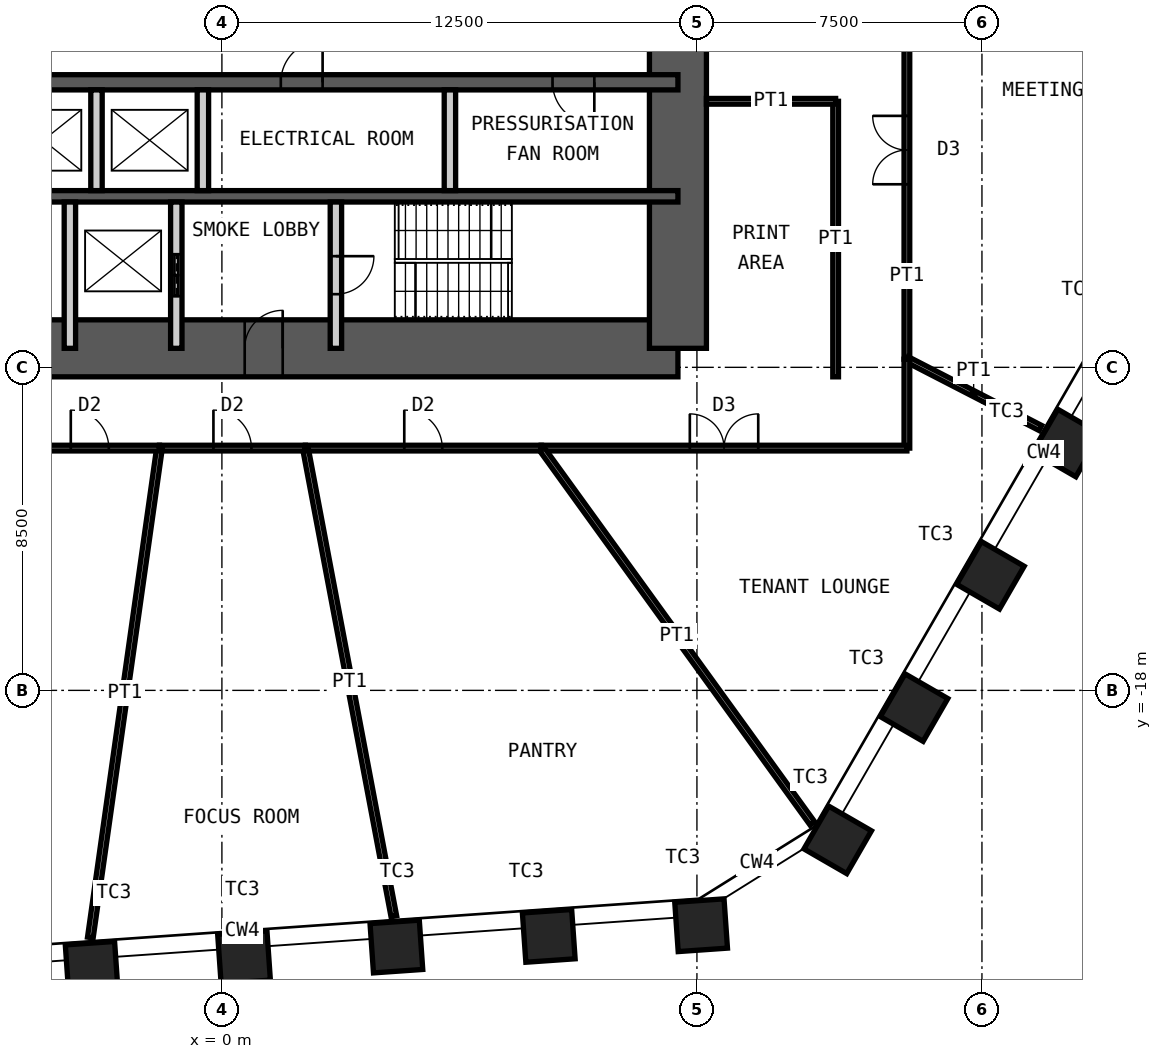
"""IFC4 building model, lengths in metres.
Left out: names, types, materials, properties, quantities, classifications, styles, units other than length and angle.
Written with IfcOpenShell. Run it as: python <this file> out.ifc"""

import sys

from ifc_helpers import new_model, si_unit, direction, frame, frame_2d, origin, origin_2d, place, context, subcontext, project, spatial, rectangle, hollow_rectangle, extrude, element, fill, save


model = new_model("IFC4")
c1 = context("Model", 3, precision=1e-05, world=origin(), true_north=direction((0.0, 1.0)))
c2 = subcontext(c1, "Body", "Model", "MODEL_VIEW")
j1 = project(units=[si_unit("LENGTHUNIT", "METRE"), si_unit("PLANEANGLEUNIT", "RADIAN")], contexts=[c1])
p1 = place(None, origin())
s1 = spatial("IfcSite", under=j1, at=p1, CompositionType="ELEMENT")
p2 = place(p1, origin())
s2 = spatial("IfcBuilding", under=s1, at=p2, CompositionType="ELEMENT")
p3 = place(p2, frame((0.0, 0.0, 115.6)))
s3 = spatial("IfcBuildingStorey", under=s2, at=p3, CompositionType="ELEMENT", Elevation=115.6)
for number, where, z_axis, x_axis in (
    (1, (22.233, -11.491, 0.0), (0.0, 0.0, 1.0), (0.5, 0.866, 0.0)),
    (2, (20.223, -14.972, 0.0), (0.0, 0.0, 1.0), (0.5, 0.866, 0.0)),
    (3, (18.214, -18.453, 0.0), (0.0, 0.0, 1.0), (0.5, 0.866, 0.0)),
    (4, (16.204, -21.933, 0.0), (0.0, 0.0, 1.0), (0.5, 0.866, 0.0)),
    (5, (12.61, -24.179, 0.0), (0.0, 0.0, 1.0), (0.998, 0.07, 0.0)),
    (6, (8.601, -24.46, 0.0), (0.0, 0.0, 1.0), (0.998, 0.07, 0.0)),
    (7, (4.592, -24.74, 0.0), (0.0, 0.0, 1.0), (0.998, 0.07, 0.0)),
    (8, (0.582, -25.02, 0.0), (0.0, 0.0, 1.0), (0.998, 0.07, 0.0)),
    (9, (-3.427, -25.301, 0.0), (0.0, 0.0, 1.0), (0.998, 0.07, 0.0)),
):
    element("IfcColumn", number, at=place(p3, frame(where, z_axis=z_axis, x_axis=x_axis)), inside=s3, PredefinedType="COLUMN", context=c2, shape_type="SweptSolid", body=[
        extrude(hollow_rectangle(XDim=1.3, YDim=1.3, WallThickness=0.1, at=origin_2d()), origin(), (0.0, 0.0, 1.0), 4.2),
    ])
p4 = place(p3, frame((-12.0, -9.0, 0.0), z_axis=(0.0, 0.0, 1.0), x_axis=(1.0, 0.0, 0.0)))
e10 = element("IfcWall", 10, at=p4, inside=s3, PredefinedType="SHEAR", context=c2, shape_type="SweptSolid", body=[
    extrude(rectangle(XDim=24.0, YDim=1.5, at=frame_2d((12.0, 0.0))), origin(), (0.0, 0.0, 1.0), 4.2),
])
p5 = place(p4, frame((1.35, 0.0, 0.0)))
e11 = element("IfcOpeningElement", 11, at=p5, cuts=e10, PredefinedType="OPENING", context=c2, shape_type="SweptSolid", body=[
    extrude(rectangle(XDim=1.0, YDim=2.1, at=frame_2d((0.5, 1.05))), frame((0.0, 0.76, 0.0), z_axis=(0.0, -1.0, 0.0), x_axis=(1.0, 0.0, 0.0)), (0.0, 0.0, 1.0), 1.52),
])
p6 = place(p4, frame((5.325, 0.0, 0.0)))
e12 = element("IfcOpeningElement", 12, at=p6, cuts=e10, PredefinedType="OPENING", context=c2, shape_type="SweptSolid", body=[
    extrude(rectangle(XDim=1.15, YDim=2.1, at=frame_2d((0.575, 1.05))), frame((0.0, 0.76, 0.0), z_axis=(0.0, -1.0, 0.0), x_axis=(1.0, 0.0, 0.0)), (0.0, 0.0, 1.0), 1.52),
])
p7 = place(p4, frame((12.6, 0.0, 0.0)))
e13 = element("IfcOpeningElement", 13, at=p7, cuts=e10, PredefinedType="OPENING", context=c2, shape_type="SweptSolid", body=[
    extrude(rectangle(XDim=1.0, YDim=2.1, at=frame_2d((0.5, 1.05))), frame((0.0, 0.76, 0.0), z_axis=(0.0, -1.0, 0.0), x_axis=(1.0, 0.0, 0.0)), (0.0, 0.0, 1.0), 1.52),
])
p8 = place(p3, frame((12.0, -9.0, 0.0), z_axis=(0.0, 0.0, 1.0), x_axis=(0.0, 1.0, 0.0)))
e14 = element("IfcWall", 14, at=p8, inside=s3, PredefinedType="SHEAR", context=c2, shape_type="SweptSolid", body=[
    extrude(rectangle(XDim=18.0, YDim=1.5, at=frame_2d((9.0, 0.0))), origin(), (0.0, 0.0, 1.0), 4.2),
])
p9 = place(p8, frame((8.1, 0.0, 0.0)))
e15 = element("IfcOpeningElement", 15, at=p9, cuts=e14, PredefinedType="OPENING", context=c2, shape_type="SweptSolid", body=[
    extrude(rectangle(XDim=1.8, YDim=2.1, at=frame_2d((0.9, 1.05))), frame((0.0, 0.76, 0.0), z_axis=(0.0, -1.0, 0.0), x_axis=(1.0, 0.0, 0.0)), (0.0, 0.0, 1.0), 1.52),
])
p10 = place(p3, frame((-12.0, -2.0, 0.0), z_axis=(0.0, 0.0, 1.0), x_axis=(1.0, 0.0, 0.0)))
e16 = element("IfcWall", 16, at=p10, inside=s3, PredefinedType="SHEAR", context=c2, shape_type="SweptSolid", body=[
    extrude(rectangle(XDim=24.0, YDim=0.4, at=frame_2d((12.0, 0.0))), origin(), (0.0, 0.0, 1.0), 4.2),
])
p11 = place(p10, frame((1.1, 0.0, 0.0)))
e17 = element("IfcOpeningElement", 17, at=p11, cuts=e16, PredefinedType="OPENING", context=c2, shape_type="SweptSolid", body=[
    extrude(rectangle(XDim=1.1, YDim=2.1, at=frame_2d((0.55, 1.05))), frame((0.0, 0.21, 0.0), z_axis=(0.0, -1.0, 0.0), x_axis=(1.0, 0.0, 0.0)), (0.0, 0.0, 1.0), 0.42),
])
p12 = place(p10, frame((13.55, 0.0, 0.0)))
e18 = element("IfcOpeningElement", 18, at=p12, cuts=e16, PredefinedType="OPENING", context=c2, shape_type="SweptSolid", body=[
    extrude(rectangle(XDim=1.1, YDim=2.1, at=frame_2d((0.55, 1.05))), frame((0.0, 0.21, 0.0), z_axis=(0.0, -1.0, 0.0), x_axis=(1.0, 0.0, 0.0)), (0.0, 0.0, 1.0), 0.42),
])
p13 = place(p10, frame((20.7, 0.0, 0.0)))
e19 = element("IfcOpeningElement", 19, at=p13, cuts=e16, PredefinedType="OPENING", context=c2, shape_type="SweptSolid", body=[
    extrude(rectangle(XDim=1.1, YDim=2.1, at=frame_2d((0.55, 1.05))), frame((0.0, 0.21, 0.0), z_axis=(0.0, -1.0, 0.0), x_axis=(1.0, 0.0, 0.0)), (0.0, 0.0, 1.0), 0.42),
])
p14 = place(p10, frame((4.0, 0.0, 0.0)))
e20 = element("IfcOpeningElement", 20, at=p14, cuts=e16, PredefinedType="OPENING", context=c2, shape_type="SweptSolid", body=[
    extrude(rectangle(XDim=1.0, YDim=2.1, at=frame_2d((0.5, 1.05))), frame((0.0, 0.21, 0.0), z_axis=(0.0, -1.0, 0.0), x_axis=(1.0, 0.0, 0.0)), (0.0, 0.0, 1.0), 0.42),
])
p15 = place(p3, frame((-12.0, -5.0, 0.0), z_axis=(0.0, 0.0, 1.0), x_axis=(1.0, 0.0, 0.0)))
e21 = element("IfcWall", 21, at=p15, inside=s3, PredefinedType="SHEAR", context=c2, shape_type="SweptSolid", body=[
    extrude(rectangle(XDim=24.0, YDim=0.3, at=frame_2d((12.0, 0.0))), origin(), (0.0, 0.0, 1.0), 4.2),
])
for number, where, z_axis, x_axis in (
    (22, (-3.3, -4.85, 0.0), (0.0, 0.0, 1.0), (0.0, 1.0, 0.0)),
    (23, (-0.5, -4.85, 0.0), (0.0, 0.0, 1.0), (0.0, 1.0, 0.0)),
    (24, (6.0, -4.85, 0.0), (0.0, 0.0, 1.0), (0.0, 1.0, 0.0)),
):
    element("IfcWall", number, at=place(p3, frame(where, z_axis=z_axis, x_axis=x_axis)), inside=s3, PredefinedType="PARTITIONING", context=c2, shape_type="SweptSolid", body=[
        extrude(rectangle(XDim=2.65, YDim=0.3, at=frame_2d((1.325, 0.0))), origin(), (0.0, 0.0, 1.0), 3.98),
    ])
p16 = place(p3, frame((-4.0, -9.0, 0.0), z_axis=(0.0, 0.0, 1.0), x_axis=(0.0, 1.0, 0.0)))
e25 = element("IfcWall", 25, at=p16, inside=s3, PredefinedType="PARTITIONING", context=c2, shape_type="SweptSolid", body=[
    extrude(rectangle(XDim=3.85, YDim=0.3, at=frame_2d((1.925, 0.0))), origin(), (0.0, 0.0, 1.0), 3.98),
])
p17 = place(p3, frame((-1.2, -9.0, 0.0), z_axis=(0.0, 0.0, 1.0), x_axis=(0.0, 1.0, 0.0)))
e26 = element("IfcWall", 26, at=p17, inside=s3, PredefinedType="PARTITIONING", context=c2, shape_type="SweptSolid", body=[
    extrude(rectangle(XDim=3.85, YDim=0.3, at=frame_2d((1.925, 0.0))), origin(), (0.0, 0.0, 1.0), 3.98),
])
p18 = place(p17, frame((1.375, 0.0, 0.0)))
e27 = element("IfcOpeningElement", 27, at=p18, cuts=e26, PredefinedType="OPENING", context=c2, shape_type="SweptSolid", body=[
    extrude(rectangle(XDim=1.1, YDim=2.4, at=frame_2d((0.55, 1.2))), frame((0.0, 0.16, 0.0), z_axis=(0.0, -1.0, 0.0), x_axis=(1.0, 0.0, 0.0)), (0.0, 0.0, 1.0), 0.32),
])
p19 = place(p3, frame((3.0, -9.0, 0.0), z_axis=(0.0, 0.0, 1.0), x_axis=(0.0, 1.0, 0.0)))
e28 = element("IfcWall", 28, at=p19, inside=s3, PredefinedType="PARTITIONING", context=c2, shape_type="SweptSolid", body=[
    extrude(rectangle(XDim=3.85, YDim=0.3, at=frame_2d((1.925, 0.0))), origin(), (0.0, 0.0, 1.0), 3.98),
])
p20 = place(p19, frame((1.425, 0.0, 0.0)))
e29 = element("IfcOpeningElement", 29, at=p20, cuts=e28, PredefinedType="OPENING", context=c2, shape_type="SweptSolid", body=[
    extrude(rectangle(XDim=1.0, YDim=2.1, at=frame_2d((0.5, 1.05))), frame((0.0, 0.16, 0.0), z_axis=(0.0, -1.0, 0.0), x_axis=(1.0, 0.0, 0.0)), (0.0, 0.0, 1.0), 0.32),
])
p21 = place(p3, frame((18.025, 1.719, 0.0), z_axis=(0.0, 0.0, 1.0), x_axis=(0.0, -1.0, 0.0)))
e30 = element("IfcWall", 30, at=p21, inside=s3, PredefinedType="PARTITIONING", context=c2, shape_type="SweptSolid", body=[
    extrude(rectangle(XDim=11.006, YDim=0.15, at=frame_2d((5.503, 0.0))), origin(), (0.0, 0.0, 1.0), 4.03),
])
p22 = place(p21, frame((4.603, 0.0, 0.0)))
e31 = element("IfcOpeningElement", 31, at=p22, cuts=e30, PredefinedType="OPENING", context=c2, shape_type="SweptSolid", body=[
    extrude(rectangle(XDim=1.8, YDim=2.4, at=frame_2d((0.9, 1.2))), frame((0.0, 0.085, 0.0), z_axis=(0.0, -1.0, 0.0), x_axis=(1.0, 0.0, 0.0)), (0.0, 0.0, 1.0), 0.17),
])
p23 = place(p3, frame((21.538, -11.096, 0.0), z_axis=(0.0, 0.0, 1.0), x_axis=(-0.888987513346, 0.457931437134, 0.0)))
e32 = element("IfcWall", 32, at=p23, inside=s3, PredefinedType="PARTITIONING", context=c2, shape_type="SweptSolid", body=[
    extrude(rectangle(XDim=3.952, YDim=0.15, at=frame_2d((1.976, 0.0))), origin(), (0.0, 0.0, 1.0), 3.33),
])
p24 = place(p3, frame((18.025, -9.286, 0.0), z_axis=(0.0, 0.0, 1.0), x_axis=(0.0, -1.0, 0.0)))
e33 = element("IfcWall", 33, at=p24, inside=s3, PredefinedType="PARTITIONING", context=c2, shape_type="SweptSolid", body=[
    extrude(rectangle(XDim=2.339, YDim=0.15, at=frame_2d((1.169, 0.0))), origin(), (0.0, 0.0, 1.0), 4.03),
])
p25 = place(p3, frame((18.025, -11.625, 0.0), z_axis=(0.0, 0.0, 1.0), x_axis=(-1.0, 0.0, 0.0)))
e34 = element("IfcWall", 34, at=p25, inside=s3, PredefinedType="PARTITIONING", context=c2, shape_type="SweptSolid", body=[
    extrude(rectangle(XDim=9.624, YDim=0.15, at=frame_2d((4.812, 0.0))), origin(), (0.0, 0.0, 1.0), 4.03),
])
p26 = place(p25, frame((3.912, 0.0, 0.0)))
e35 = element("IfcOpeningElement", 35, at=p26, cuts=e34, PredefinedType="OPENING", context=c2, shape_type="SweptSolid", body=[
    extrude(rectangle(XDim=1.8, YDim=2.4, at=frame_2d((0.9, 1.2))), frame((0.0, 0.085, 0.0), z_axis=(0.0, -1.0, 0.0), x_axis=(1.0, 0.0, 0.0)), (0.0, 0.0, 1.0), 0.17),
])
p27 = place(p3, frame((15.54, -21.502, 0.0), z_axis=(0.0, 0.0, 1.0), x_axis=(-0.585731902034, 0.810504866697, 0.0)))
e36 = element("IfcWall", 36, at=p27, inside=s3, PredefinedType="PARTITIONING", context=c2, shape_type="SweptSolid", body=[
    extrude(rectangle(XDim=12.187, YDim=0.15, at=frame_2d((6.093, 0.0))), origin(), (0.0, 0.0, 1.0), 2.93),
])
p28 = place(p3, frame((8.401, -11.625, 0.0), z_axis=(0.0, 0.0, 1.0), x_axis=(-1.0, 0.0, 0.0)))
e37 = element("IfcWall", 37, at=p28, inside=s3, PredefinedType="PARTITIONING", context=c2, shape_type="SweptSolid", body=[
    extrude(rectangle(XDim=6.205, YDim=0.15, at=frame_2d((3.103, 0.0))), origin(), (0.0, 0.0, 1.0), 4.03),
])
p29 = place(p28, frame((2.602, 0.0, 0.0)))
e38 = element("IfcOpeningElement", 38, at=p29, cuts=e37, PredefinedType="OPENING", context=c2, shape_type="SweptSolid", body=[
    extrude(rectangle(XDim=1.0, YDim=2.4, at=frame_2d((0.5, 1.2))), frame((0.0, 0.085, 0.0), z_axis=(0.0, -1.0, 0.0), x_axis=(1.0, 0.0, 0.0)), (0.0, 0.0, 1.0), 0.17),
])
p30 = place(p3, frame((4.524, -23.943, 0.0), z_axis=(0.0, 0.0, 1.0), x_axis=(-0.185671124909, 0.98261194445, 0.0)))
e39 = element("IfcWall", 39, at=p30, inside=s3, PredefinedType="PARTITIONING", context=c2, shape_type="SweptSolid", body=[
    extrude(rectangle(XDim=12.536, YDim=0.15, at=frame_2d((6.268, 0.0))), origin(), (0.0, 0.0, 1.0), 3.33),
])
p31 = place(p3, frame((2.197, -11.625, 0.0), z_axis=(0.0, 0.0, 1.0), x_axis=(-1.0, 0.0, 0.0)))
e40 = element("IfcWall", 40, at=p31, inside=s3, PredefinedType="PARTITIONING", context=c2, shape_type="SweptSolid", body=[
    extrude(rectangle(XDim=3.839, YDim=0.15, at=frame_2d((1.919, 0.0))), origin(), (0.0, 0.0, 1.0), 4.03),
])
p32 = place(p31, frame((1.419, 0.0, 0.0)))
e41 = element("IfcOpeningElement", 41, at=p32, cuts=e40, PredefinedType="OPENING", context=c2, shape_type="SweptSolid", body=[
    extrude(rectangle(XDim=1.0, YDim=2.4, at=frame_2d((0.5, 1.2))), frame((0.0, 0.085, 0.0), z_axis=(0.0, -1.0, 0.0), x_axis=(1.0, 0.0, 0.0)), (0.0, 0.0, 1.0), 0.17),
])
p33 = place(p3, frame((-3.462, -24.503, 0.0), z_axis=(0.0, 0.0, 1.0), x_axis=(0.139899618934, 0.990165691499, 0.0)))
e42 = element("IfcWall", 42, at=p33, inside=s3, PredefinedType="PARTITIONING", context=c2, shape_type="SweptSolid", body=[
    extrude(rectangle(XDim=13.006, YDim=0.15, at=frame_2d((6.503, 0.0))), origin(), (0.0, 0.0, 1.0), 3.33),
])
p34 = place(p3, frame((-1.642, -11.625, 0.0), z_axis=(0.0, 0.0, 1.0), x_axis=(-1.0, 0.0, 0.0)))
e43 = element("IfcWall", 43, at=p34, inside=s3, PredefinedType="PARTITIONING", context=c2, shape_type="SweptSolid", body=[
    extrude(rectangle(XDim=3.668, YDim=0.15, at=frame_2d((1.834, 0.0))), origin(), (0.0, 0.0, 1.0), 4.03),
])
p35 = place(p34, frame((1.334, 0.0, 0.0)))
e44 = element("IfcOpeningElement", 44, at=p35, cuts=e43, PredefinedType="OPENING", context=c2, shape_type="SweptSolid", body=[
    extrude(rectangle(XDim=1.0, YDim=2.4, at=frame_2d((0.5, 1.2))), frame((0.0, 0.085, 0.0), z_axis=(0.0, -1.0, 0.0), x_axis=(1.0, 0.0, 0.0)), (0.0, 0.0, 1.0), 0.17),
])
p36 = place(p3, frame((16.15, -9.75, 0.0), z_axis=(0.0, 0.0, 1.0), x_axis=(0.0, 1.0, 0.0)))
e45 = element("IfcWall", 45, at=p36, inside=s3, PredefinedType="PARTITIONING", context=c2, shape_type="SweptSolid", body=[
    extrude(rectangle(XDim=7.25, YDim=0.15, at=frame_2d((3.625, 0.0))), origin(), (0.0, 0.0, 1.0), 4.03),
])
p37 = place(p3, frame((12.75, -2.5, 0.0), z_axis=(0.0, 0.0, 1.0), x_axis=(1.0, 0.0, 0.0)))
e46 = element("IfcWall", 46, at=p37, inside=s3, PredefinedType="PARTITIONING", context=c2, shape_type="SweptSolid", body=[
    extrude(rectangle(XDim=3.4, YDim=0.15, at=frame_2d((1.7, 0.0))), origin(), (0.0, 0.0, 1.0), 3.33),
])
p38 = place(p7, origin())
e47 = element("IfcDoor", 47, at=p38, inside=s3, OperationType="SINGLE_SWING_LEFT", PredefinedType="DOOR", context=c2, shape_type="SweptSolid", body=[
    extrude(rectangle(XDim=1.0, YDim=2.1, at=frame_2d((0.5, 1.05))), frame((0.0, 0.025, 0.0), z_axis=(0.0, -1.0, 0.0), x_axis=(1.0, 0.0, 0.0)), (0.0, 0.0, 1.0), 0.05),
])
fill(e13, e47)
p39 = place(p20, origin())
e48 = element("IfcDoor", 48, at=p39, inside=s3, OperationType="SINGLE_SWING_RIGHT", PredefinedType="DOOR", context=c2, shape_type="SweptSolid", body=[
    extrude(rectangle(XDim=1.0, YDim=2.1, at=frame_2d((0.5, 1.05))), frame((0.0, 0.025, 0.0), z_axis=(0.0, -1.0, 0.0), x_axis=(1.0, 0.0, 0.0)), (0.0, 0.0, 1.0), 0.05),
])
fill(e29, e48)
p40 = place(p12, origin())
e49 = element("IfcDoor", 49, at=p40, inside=s3, OperationType="SINGLE_SWING_LEFT", PredefinedType="DOOR", context=c2, shape_type="SweptSolid", body=[
    extrude(rectangle(XDim=1.1, YDim=2.1, at=frame_2d((0.55, 1.05))), frame((0.0, 0.025, 0.0), z_axis=(0.0, -1.0, 0.0), x_axis=(1.0, 0.0, 0.0)), (0.0, 0.0, 1.0), 0.05),
])
fill(e18, e49)
p41 = place(p13, origin())
e50 = element("IfcDoor", 50, at=p41, inside=s3, OperationType="SINGLE_SWING_RIGHT", PredefinedType="DOOR", context=c2, shape_type="SweptSolid", body=[
    extrude(rectangle(XDim=1.1, YDim=2.1, at=frame_2d((0.55, 1.05))), frame((0.0, 0.025, 0.0), z_axis=(0.0, -1.0, 0.0), x_axis=(1.0, 0.0, 0.0)), (0.0, 0.0, 1.0), 0.05),
])
fill(e19, e50)
p42 = place(p18, origin())
e51 = element("IfcDoor", 51, at=p42, inside=s3, OperationType="DOUBLE_DOOR_SLIDING", PredefinedType="DOOR", context=c2, shape_type="SweptSolid", body=[
    extrude(rectangle(XDim=1.1, YDim=2.4, at=frame_2d((0.55, 1.2))), frame((0.0, 0.025, 0.0), z_axis=(0.0, -1.0, 0.0), x_axis=(1.0, 0.0, 0.0)), (0.0, 0.0, 1.0), 0.05),
])
fill(e27, e51)
p43 = place(p22, origin())
e52 = element("IfcDoor", 52, at=p43, inside=s3, OperationType="DOUBLE_DOOR_DOUBLE_SWING", PredefinedType="DOOR", context=c2, shape_type="SweptSolid", body=[
    extrude(rectangle(XDim=1.8, YDim=2.4, at=frame_2d((0.9, 1.2))), frame((0.0, 0.025, 0.0), z_axis=(0.0, -1.0, 0.0), x_axis=(1.0, 0.0, 0.0)), (0.0, 0.0, 1.0), 0.05),
])
fill(e31, e52)
p44 = place(p26, origin())
e53 = element("IfcDoor", 53, at=p44, inside=s3, OperationType="DOUBLE_DOOR_DOUBLE_SWING", PredefinedType="DOOR", context=c2, shape_type="SweptSolid", body=[
    extrude(rectangle(XDim=1.8, YDim=2.4, at=frame_2d((0.9, 1.2))), frame((0.0, 0.025, 0.0), z_axis=(0.0, -1.0, 0.0), x_axis=(1.0, 0.0, 0.0)), (0.0, 0.0, 1.0), 0.05),
])
fill(e35, e53)
p45 = place(p29, origin())
e54 = element("IfcDoor", 54, at=p45, inside=s3, OperationType="SINGLE_SWING_RIGHT", PredefinedType="DOOR", context=c2, shape_type="SweptSolid", body=[
    extrude(rectangle(XDim=1.0, YDim=2.4, at=frame_2d((0.5, 1.2))), frame((0.0, 0.025, 0.0), z_axis=(0.0, -1.0, 0.0), x_axis=(1.0, 0.0, 0.0)), (0.0, 0.0, 1.0), 0.05),
])
fill(e38, e54)
p46 = place(p32, origin())
e55 = element("IfcDoor", 55, at=p46, inside=s3, OperationType="SINGLE_SWING_RIGHT", PredefinedType="DOOR", context=c2, shape_type="SweptSolid", body=[
    extrude(rectangle(XDim=1.0, YDim=2.4, at=frame_2d((0.5, 1.2))), frame((0.0, 0.025, 0.0), z_axis=(0.0, -1.0, 0.0), x_axis=(1.0, 0.0, 0.0)), (0.0, 0.0, 1.0), 0.05),
])
fill(e41, e55)
p47 = place(p35, origin())
e56 = element("IfcDoor", 56, at=p47, inside=s3, OperationType="SINGLE_SWING_RIGHT", PredefinedType="DOOR", context=c2, shape_type="SweptSolid", body=[
    extrude(rectangle(XDim=1.0, YDim=2.4, at=frame_2d((0.5, 1.2))), frame((0.0, 0.025, 0.0), z_axis=(0.0, -1.0, 0.0), x_axis=(1.0, 0.0, 0.0)), (0.0, 0.0, 1.0), 0.05),
])
fill(e44, e56)
save(model, sys.argv[1])
